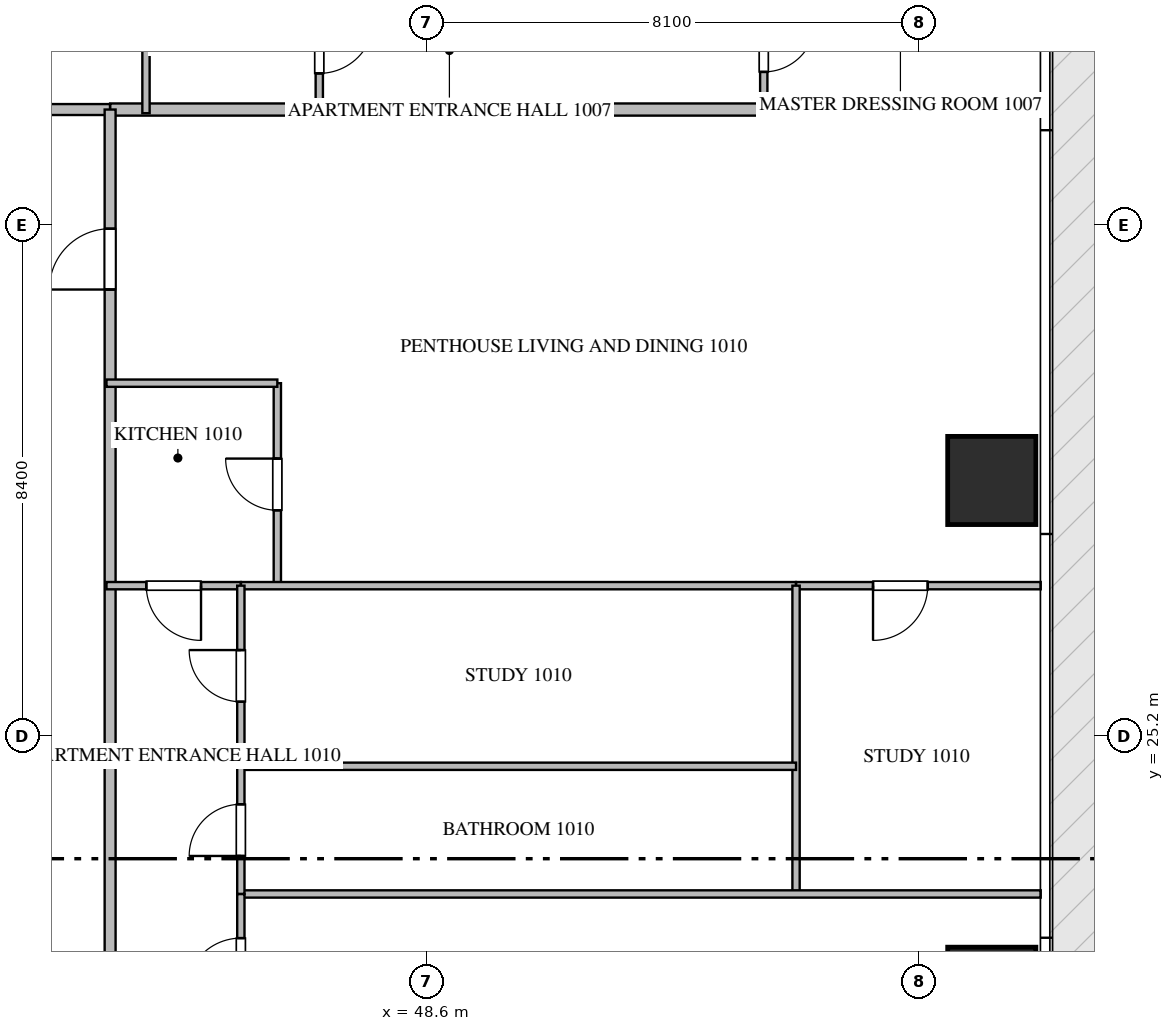
"""IFC4 building model, lengths in metres.
Left out: names, types, materials, properties, quantities, classifications, styles, units other than length and angle.
Written with IfcOpenShell. Run it as: python <this file> out.ifc"""

import sys

from ifc_helpers import new_model, si_unit, direction, frame, frame_2d, origin, origin_2d, place, context, subcontext, project, spatial, rectangle, extrude, source, transform, mapped, element, fill, save


model = new_model("IFC4")
c1 = context("Model", 3, precision=1e-05, world=origin(), true_north=direction((0.0, 1.0)))
c2 = subcontext(c1, "Body", "Model", "MODEL_VIEW")
j1 = project(units=[si_unit("LENGTHUNIT", "METRE"), si_unit("PLANEANGLEUNIT", "RADIAN")], contexts=[c1])
p1 = place(None, origin())
s1 = spatial("IfcSite", under=j1, at=p1, CompositionType="ELEMENT")
p2 = place(p1, origin())
s2 = spatial("IfcBuilding", under=s1, at=p2, CompositionType="ELEMENT")
p3 = place(p2, frame((0.0, 0.0, 45.45)))
s3 = spatial("IfcBuildingStorey", under=s2, at=p3, CompositionType="ELEMENT", Elevation=45.45)
m1 = source(origin(), c2, "Body", "SweptSolid", [
    extrude(rectangle(XDim=1.45, YDim=1.45, at=origin_2d()), origin(), (0.0, 0.0, 1.0), 3.75),
])
for number, where, z_axis, x_axis in (
    (1, (57.9, 21.0, -0.26), (0.0, 0.0, 1.0), (1.0, 0.0, 0.0)),
    (2, (57.9, 29.4, -0.26), (0.0, 0.0, 1.0), (1.0, 0.0, 0.0)),
):
    element("IfcColumn", number, at=place(p3, frame(where, z_axis=z_axis, x_axis=x_axis)), inside=s3, PredefinedType="COLUMN", context=c2, shape_type="MappedRepresentation", body=[
        mapped(m1, transform((0.0, 0.0, 0.0), scale=1.0)),
    ])
p4 = place(p3, frame((43.4, 35.5, 0.0), z_axis=(0.0, 0.0, 1.0), x_axis=(1.0, 0.0, 0.0)))
e3 = element("IfcWall", 3, at=p4, inside=s3, PredefinedType="PARTITIONING", context=c2, shape_type="SweptSolid", body=[
    extrude(rectangle(XDim=15.318, YDim=0.2, at=frame_2d((7.659, 0.0))), origin(), (0.0, 0.0, 1.0), 3.49),
])
p5 = place(p3, frame((21.402, 35.5, 0.0), z_axis=(0.0, 0.0, 1.0), x_axis=(1.0, 0.0, 0.0)))
e4 = element("IfcWall", 4, at=p5, inside=s3, PredefinedType="PARTITIONING", context=c2, shape_type="SweptSolid", body=[
    extrude(rectangle(XDim=21.996, YDim=0.18, at=frame_2d((10.998, 0.0))), origin(), (0.0, 0.0, 1.0), 3.49),
])
p6 = place(p5, frame((2.1, 0.0, 0.0)))
e5 = element("IfcOpeningElement", 5, at=p6, cuts=e4, PredefinedType="OPENING", context=c2, shape_type="SweptSolid", body=[
    extrude(rectangle(XDim=1.0, YDim=2.15, at=frame_2d((0.5, 1.075))), frame((0.0, 0.1, 0.0), z_axis=(0.0, -1.0, 0.0), x_axis=(1.0, 0.0, 0.0)), (0.0, 0.0, 1.0), 0.2),
])
p7 = place(p5, frame((5.333, 0.0, 0.0)))
e6 = element("IfcOpeningElement", 6, at=p7, cuts=e4, PredefinedType="OPENING", context=c2, shape_type="SweptSolid", body=[
    extrude(rectangle(XDim=1.0, YDim=2.15, at=frame_2d((0.5, 1.075))), frame((0.0, 0.1, 0.0), z_axis=(0.0, -1.0, 0.0), x_axis=(1.0, 0.0, 0.0)), (0.0, 0.0, 1.0), 0.2),
])
p8 = place(p5, frame((11.842, 0.0, 0.0)))
e7 = element("IfcOpeningElement", 7, at=p8, cuts=e4, PredefinedType="OPENING", context=c2, shape_type="SweptSolid", body=[
    extrude(rectangle(XDim=1.0, YDim=2.15, at=frame_2d((0.5, 1.075))), frame((0.0, 0.1, 0.0), z_axis=(0.0, -1.0, 0.0), x_axis=(1.0, 0.0, 0.0)), (0.0, 0.0, 1.0), 0.2),
])
p9 = place(p5, frame((18.896, 0.0, 0.0)))
e8 = element("IfcOpeningElement", 8, at=p9, cuts=e4, PredefinedType="OPENING", context=c2, shape_type="SweptSolid", body=[
    extrude(rectangle(XDim=1.0, YDim=2.15, at=frame_2d((0.5, 1.075))), frame((0.0, 0.1, 0.0), z_axis=(0.0, -1.0, 0.0), x_axis=(1.0, 0.0, 0.0)), (0.0, 0.0, 1.0), 0.2),
])
p10 = place(p3, frame((43.4, 14.9, 0.0), z_axis=(0.0, 0.0, 1.0), x_axis=(0.0, 1.0, 0.0)))
e9 = element("IfcWall", 9, at=p10, inside=s3, PredefinedType="PARTITIONING", context=c2, shape_type="SweptSolid", body=[
    extrude(rectangle(XDim=20.6, YDim=0.18, at=frame_2d((10.3, 0.0))), origin(), (0.0, 0.0, 1.0), 3.49),
])
p11 = place(p10, frame((17.64, 0.0, 0.0)))
e10 = element("IfcOpeningElement", 10, at=p11, cuts=e9, PredefinedType="OPENING", context=c2, shape_type="SweptSolid", body=[
    extrude(rectangle(XDim=1.0, YDim=2.15, at=frame_2d((0.5, 1.075))), frame((0.0, 0.1, 0.0), z_axis=(0.0, -1.0, 0.0), x_axis=(1.0, 0.0, 0.0)), (0.0, 0.0, 1.0), 0.2),
])
p12 = place(p3, frame((43.99, 38.25, 0.0), z_axis=(0.0, 0.0, 1.0), x_axis=(0.0, -1.0, 0.0)))
e11 = element("IfcWall", 11, at=p12, inside=s3, PredefinedType="PARTITIONING", context=c2, shape_type="SweptSolid", body=[
    extrude(rectangle(XDim=2.81, YDim=0.12, at=frame_2d((1.405, 0.0))), origin(), (0.0, 0.0, 1.0), 3.49),
])
p13 = place(p3, frame((46.84, 37.65, 0.0), z_axis=(0.0, 0.0, 1.0), x_axis=(0.0, -1.0, 0.0)))
e12 = element("IfcWall", 12, at=p13, inside=s3, PredefinedType="PARTITIONING", context=c2, shape_type="SweptSolid", body=[
    extrude(rectangle(XDim=2.21, YDim=0.12, at=frame_2d((1.105, 0.0))), origin(), (0.0, 0.0, 1.0), 3.49),
])
p14 = place(p13, frame((0.655, 0.0, 0.0)))
e13 = element("IfcOpeningElement", 13, at=p14, cuts=e12, PredefinedType="OPENING", context=c2, shape_type="SweptSolid", body=[
    extrude(rectangle(XDim=0.9, YDim=2.1, at=frame_2d((0.45, 1.05))), frame((0.0, 0.07, 0.0), z_axis=(0.0, -1.0, 0.0), x_axis=(1.0, 0.0, 0.0)), (0.0, 0.0, 1.0), 0.14),
])
p15 = place(p3, frame((54.15, 37.648, 0.0), z_axis=(0.0, 0.0, 1.0), x_axis=(0.0, -1.0, 0.0)))
e14 = element("IfcWall", 14, at=p15, inside=s3, PredefinedType="PARTITIONING", context=c2, shape_type="SweptSolid", body=[
    extrude(rectangle(XDim=2.208, YDim=0.12, at=frame_2d((1.104, 0.0))), origin(), (0.0, 0.0, 1.0), 3.49),
])
p16 = place(p15, frame((0.679, 0.0, 0.0)))
e15 = element("IfcOpeningElement", 15, at=p16, cuts=e14, PredefinedType="OPENING", context=c2, shape_type="SweptSolid", body=[
    extrude(rectangle(XDim=0.85, YDim=2.1, at=frame_2d((0.425, 1.05))), frame((0.0, 0.07, 0.0), z_axis=(0.0, -1.0, 0.0), x_axis=(1.0, 0.0, 0.0)), (0.0, 0.0, 1.0), 0.14),
])
p17 = place(p3, frame((46.15, 27.67, 0.0), z_axis=(0.0, 0.0, 1.0), x_axis=(0.0, 1.0, 0.0)))
e16 = element("IfcWall", 16, at=p17, inside=s3, PredefinedType="PARTITIONING", context=c2, shape_type="SweptSolid", body=[
    extrude(rectangle(XDim=3.33, YDim=0.12, at=frame_2d((1.665, 0.0))), origin(), (0.0, 0.0, 1.0), 3.49),
])
p18 = place(p17, frame((1.24, 0.0, 0.0)))
e17 = element("IfcOpeningElement", 17, at=p18, cuts=e16, PredefinedType="OPENING", context=c2, shape_type="SweptSolid", body=[
    extrude(rectangle(XDim=0.85, YDim=2.1, at=frame_2d((0.425, 1.05))), frame((0.0, 0.07, 0.0), z_axis=(0.0, -1.0, 0.0), x_axis=(1.0, 0.0, 0.0)), (0.0, 0.0, 1.0), 0.14),
])
p19 = place(p3, frame((46.15, 31.0, 0.0), z_axis=(0.0, 0.0, 1.0), x_axis=(-1.0, 0.0, 0.0)))
e18 = element("IfcWall", 18, at=p19, inside=s3, PredefinedType="PARTITIONING", context=c2, shape_type="SweptSolid", body=[
    extrude(rectangle(XDim=2.81, YDim=0.12, at=frame_2d((1.405, 0.0))), origin(), (0.0, 0.0, 1.0), 3.49),
])
p20 = place(p3, frame((45.55, 27.67, 0.0), z_axis=(0.0, 0.0, 1.0), x_axis=(-1.0, 0.0, 0.0)))
e19 = element("IfcWall", 19, at=p20, inside=s3, PredefinedType="PARTITIONING", context=c2, shape_type="SweptSolid", body=[
    extrude(rectangle(XDim=2.21, YDim=0.12, at=frame_2d((1.105, 0.0))), origin(), (0.0, 0.0, 1.0), 3.49),
])
p21 = place(p20, frame((0.655, 0.0, 0.0)))
e20 = element("IfcOpeningElement", 20, at=p21, cuts=e19, PredefinedType="OPENING", context=c2, shape_type="SweptSolid", body=[
    extrude(rectangle(XDim=0.9, YDim=2.1, at=frame_2d((0.45, 1.05))), frame((0.0, 0.07, 0.0), z_axis=(0.0, -1.0, 0.0), x_axis=(1.0, 0.0, 0.0)), (0.0, 0.0, 1.0), 0.14),
])
p22 = place(p3, frame((58.705, 27.67, 0.0), z_axis=(0.0, 0.0, 1.0), x_axis=(-1.0, 0.0, 0.0)))
e21 = element("IfcWall", 21, at=p22, inside=s3, PredefinedType="PARTITIONING", context=c2, shape_type="SweptSolid", body=[
    extrude(rectangle(XDim=4.024, YDim=0.12, at=frame_2d((2.012, 0.0))), origin(), (0.0, 0.0, 1.0), 3.49),
])
p23 = place(p22, frame((1.858, 0.0, 0.0)))
e22 = element("IfcOpeningElement", 22, at=p23, cuts=e21, PredefinedType="OPENING", context=c2, shape_type="SweptSolid", body=[
    extrude(rectangle(XDim=0.9, YDim=2.1, at=frame_2d((0.45, 1.05))), frame((0.0, 0.07, 0.0), z_axis=(0.0, -1.0, 0.0), x_axis=(1.0, 0.0, 0.0)), (0.0, 0.0, 1.0), 0.14),
])
p24 = place(p3, frame((54.679, 27.67, 0.0), z_axis=(0.0, 0.0, 1.0), x_axis=(-1.0, 0.0, 0.0)))
e23 = element("IfcWall", 23, at=p24, inside=s3, PredefinedType="PARTITIONING", context=c2, shape_type="SweptSolid", body=[
    extrude(rectangle(XDim=9.127, YDim=0.12, at=frame_2d((4.563, 0.0))), origin(), (0.0, 0.0, 1.0), 3.49),
])
p25 = place(p3, frame((54.681, 22.6, 0.0), z_axis=(0.0, 0.0, 1.0), x_axis=(0.0, 1.0, 0.0)))
e24 = element("IfcWall", 24, at=p25, inside=s3, PredefinedType="PARTITIONING", context=c2, shape_type="SweptSolid", body=[
    extrude(rectangle(XDim=5.07, YDim=0.12, at=frame_2d((2.535, 0.0))), origin(), (0.0, 0.0, 1.0), 3.49),
])
p26 = place(p3, frame((58.705, 22.6, 0.0), z_axis=(0.0, 0.0, 1.0), x_axis=(-1.0, 0.0, 0.0)))
e25 = element("IfcWall", 25, at=p26, inside=s3, PredefinedType="PARTITIONING", context=c2, shape_type="SweptSolid", body=[
    extrude(rectangle(XDim=13.155, YDim=0.12, at=frame_2d((6.578, 0.0))), origin(), (0.0, 0.0, 1.0), 3.49),
])
p27 = place(p3, frame((54.681, 24.7, 0.0), z_axis=(0.0, 0.0, 1.0), x_axis=(-1.0, 0.0, 0.0)))
e26 = element("IfcWall", 26, at=p27, inside=s3, PredefinedType="PARTITIONING", context=c2, shape_type="SweptSolid", body=[
    extrude(rectangle(XDim=9.131, YDim=0.12, at=frame_2d((4.565, 0.0))), origin(), (0.0, 0.0, 1.0), 3.49),
])
p28 = place(p3, frame((45.55, 22.6, 0.0), z_axis=(0.0, 0.0, 1.0), x_axis=(0.0, 1.0, 0.0)))
e27 = element("IfcWall", 27, at=p28, inside=s3, PredefinedType="PARTITIONING", context=c2, shape_type="SweptSolid", body=[
    extrude(rectangle(XDim=2.1, YDim=0.12, at=frame_2d((1.05, 0.0))), origin(), (0.0, 0.0, 1.0), 3.49),
])
p29 = place(p28, frame((0.625, 0.0, 0.0)))
e28 = element("IfcOpeningElement", 28, at=p29, cuts=e27, PredefinedType="OPENING", context=c2, shape_type="SweptSolid", body=[
    extrude(rectangle(XDim=0.85, YDim=2.1, at=frame_2d((0.425, 1.05))), frame((0.0, 0.07, 0.0), z_axis=(0.0, -1.0, 0.0), x_axis=(1.0, 0.0, 0.0)), (0.0, 0.0, 1.0), 0.14),
])
p30 = place(p3, frame((45.55, 24.702, 0.0), z_axis=(0.0, 0.0, 1.0), x_axis=(0.0, 1.0, 0.0)))
e29 = element("IfcWall", 29, at=p30, inside=s3, PredefinedType="PARTITIONING", context=c2, shape_type="SweptSolid", body=[
    extrude(rectangle(XDim=2.968, YDim=0.12, at=frame_2d((1.484, 0.0))), origin(), (0.0, 0.0, 1.0), 3.49),
])
p31 = place(p30, frame((1.059, 0.0, 0.0)))
e30 = element("IfcOpeningElement", 30, at=p31, cuts=e29, PredefinedType="OPENING", context=c2, shape_type="SweptSolid", body=[
    extrude(rectangle(XDim=0.85, YDim=2.1, at=frame_2d((0.425, 1.05))), frame((0.0, 0.07, 0.0), z_axis=(0.0, -1.0, 0.0), x_axis=(1.0, 0.0, 0.0)), (0.0, 0.0, 1.0), 0.14),
])
p32 = place(p3, frame((45.55, 20.25, 0.0), z_axis=(0.0, 0.0, 1.0), x_axis=(0.0, 1.0, 0.0)))
e31 = element("IfcWall", 31, at=p32, inside=s3, PredefinedType="PARTITIONING", context=c2, shape_type="SweptSolid", body=[
    extrude(rectangle(XDim=2.348, YDim=0.12, at=frame_2d((1.174, 0.0))), origin(), (0.0, 0.0, 1.0), 3.49),
])
p33 = place(p32, frame((0.724, 0.0, 0.0)))
e32 = element("IfcOpeningElement", 32, at=p33, cuts=e31, PredefinedType="OPENING", context=c2, shape_type="SweptSolid", body=[
    extrude(rectangle(XDim=0.9, YDim=2.1, at=frame_2d((0.45, 1.05))), frame((0.0, 0.07, 0.0), z_axis=(0.0, -1.0, 0.0), x_axis=(1.0, 0.0, 0.0)), (0.0, 0.0, 1.0), 0.14),
])
m2 = source(origin(), c2, "Body", "SweptSolid", [
    extrude(rectangle(XDim=1.0, YDim=2.15, at=frame_2d((0.5, 1.075))), frame((0.0, 0.025, 0.0), z_axis=(0.0, -1.0, 0.0), x_axis=(1.0, 0.0, 0.0)), (0.0, 0.0, 1.0), 0.05),
])
p34 = place(p11, origin())
e33 = element("IfcDoor", 33, at=p34, inside=s3, OperationType="SINGLE_SWING_LEFT", PredefinedType="DOOR", context=c2, shape_type="MappedRepresentation", body=[
    mapped(m2, transform((0.0, 0.0, 0.0), scale=1.0)),
])
fill(e10, e33)
m3 = source(origin(), c2, "Body", "SweptSolid", [
    extrude(rectangle(XDim=0.9, YDim=2.1, at=frame_2d((0.45, 1.05))), frame((0.0, 0.025, 0.0), z_axis=(0.0, -1.0, 0.0), x_axis=(1.0, 0.0, 0.0)), (0.0, 0.0, 1.0), 0.05),
])
p35 = place(p14, origin())
e34 = element("IfcDoor", 34, at=p35, inside=s3, OperationType="SINGLE_SWING_LEFT", PredefinedType="DOOR", context=c2, shape_type="MappedRepresentation", body=[
    mapped(m3, transform((0.0, 0.0, 0.0), scale=1.0)),
])
fill(e13, e34)
m4 = source(origin(), c2, "Body", "SweptSolid", [
    extrude(rectangle(XDim=0.85, YDim=2.1, at=frame_2d((0.425, 1.05))), frame((0.0, 0.025, 0.0), z_axis=(0.0, -1.0, 0.0), x_axis=(1.0, 0.0, 0.0)), (0.0, 0.0, 1.0), 0.05),
])
p36 = place(p16, origin())
e35 = element("IfcDoor", 35, at=p36, inside=s3, OperationType="SINGLE_SWING_LEFT", PredefinedType="DOOR", context=c2, shape_type="MappedRepresentation", body=[
    mapped(m4, transform((0.0, 0.0, 0.0), scale=1.0)),
])
fill(e15, e35)
p37 = place(p18, origin())
e36 = element("IfcDoor", 36, at=p37, inside=s3, OperationType="SINGLE_SWING_RIGHT", PredefinedType="DOOR", context=c2, shape_type="MappedRepresentation", body=[
    mapped(m4, transform((0.0, 0.0, 0.0), scale=1.0)),
])
fill(e17, e36)
p38 = place(p21, origin())
e37 = element("IfcDoor", 37, at=p38, inside=s3, OperationType="SINGLE_SWING_LEFT", PredefinedType="DOOR", context=c2, shape_type="MappedRepresentation", body=[
    mapped(m3, transform((0.0, 0.0, 0.0), scale=1.0)),
])
fill(e20, e37)
p39 = place(p23, origin())
e38 = element("IfcDoor", 38, at=p39, inside=s3, OperationType="SINGLE_SWING_RIGHT", PredefinedType="DOOR", context=c2, shape_type="MappedRepresentation", body=[
    mapped(m3, transform((0.0, 0.0, 0.0), scale=1.0)),
])
fill(e22, e38)
p40 = place(p29, origin())
e39 = element("IfcDoor", 39, at=p40, inside=s3, OperationType="SINGLE_SWING_LEFT", PredefinedType="DOOR", context=c2, shape_type="MappedRepresentation", body=[
    mapped(m4, transform((0.0, 0.0, 0.0), scale=1.0)),
])
fill(e28, e39)
p41 = place(p31, origin())
e40 = element("IfcDoor", 40, at=p41, inside=s3, OperationType="SINGLE_SWING_RIGHT", PredefinedType="DOOR", context=c2, shape_type="MappedRepresentation", body=[
    mapped(m4, transform((0.0, 0.0, 0.0), scale=1.0)),
])
fill(e30, e40)
p42 = place(p33, origin())
e41 = element("IfcDoor", 41, at=p42, inside=s3, OperationType="SINGLE_SWING_LEFT", PredefinedType="DOOR", context=c2, shape_type="MappedRepresentation", body=[
    mapped(m3, transform((0.0, 0.0, 0.0), scale=1.0)),
])
fill(e32, e41)
save(model, sys.argv[1])
